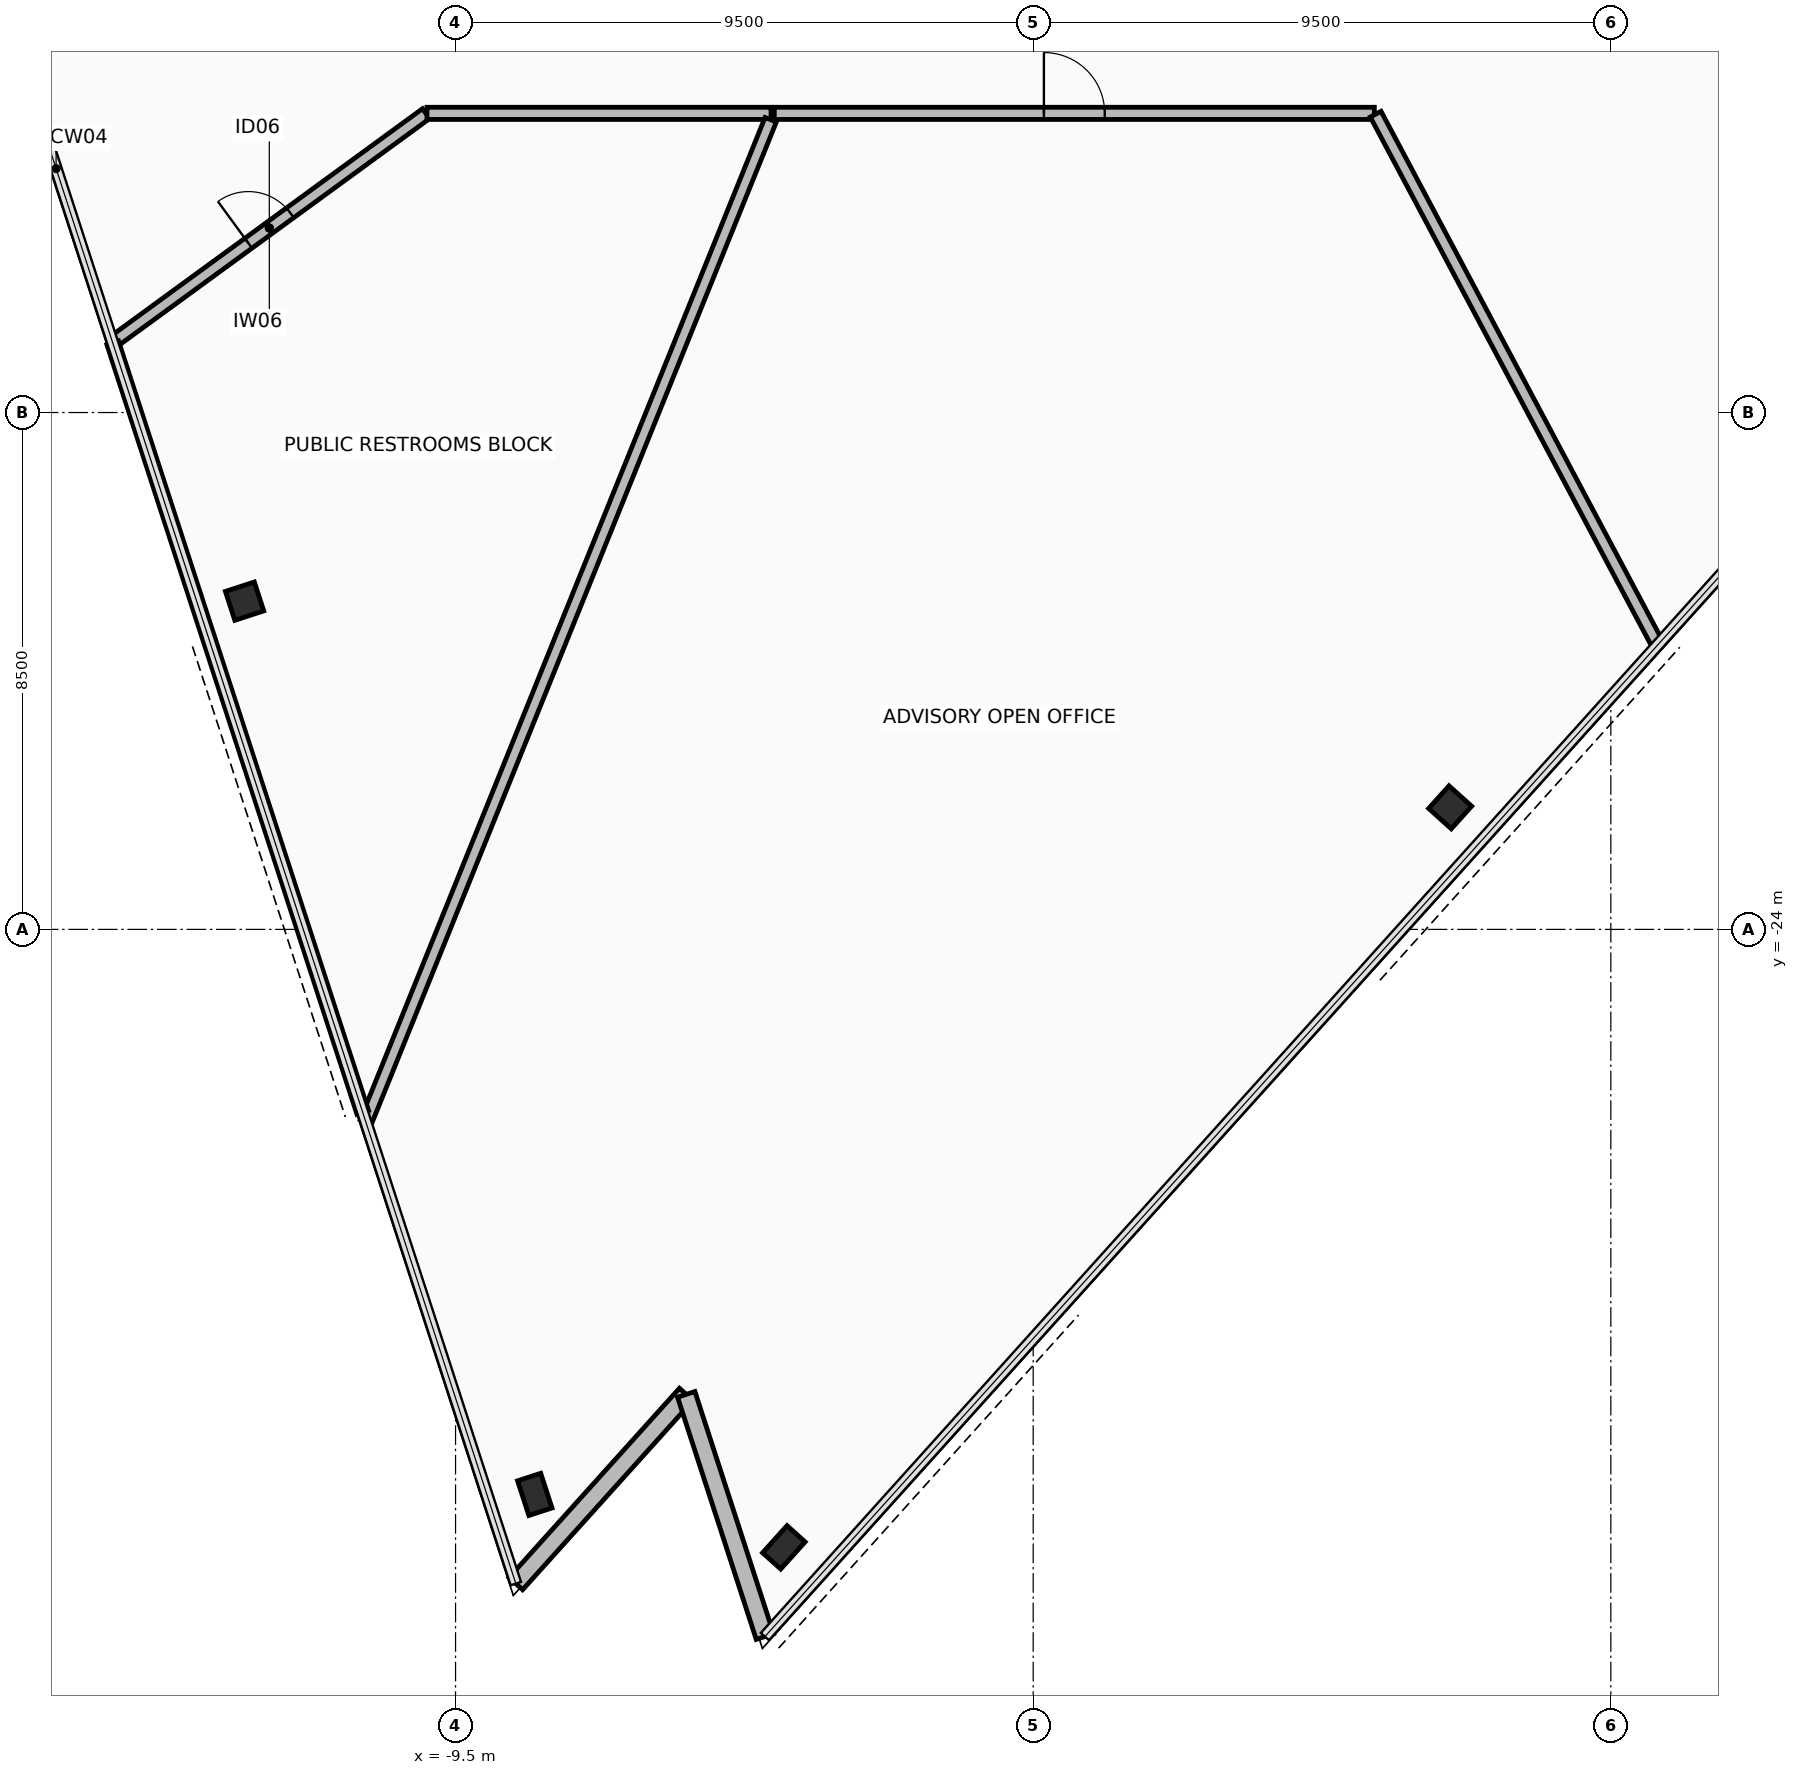
"""IFC4 building model, lengths in metres.
Left out: names, types, materials, properties, quantities, classifications, styles, units other than length and angle.
Written with IfcOpenShell. Run it as: python <this file> out.ifc"""

import sys

from ifc_helpers import new_model, si_unit, direction, frame, frame_2d, origin, origin_2d, place, context, subcontext, project, spatial, rectangle, hollow_rectangle, extrude, element, fill, save


model = new_model("IFC4")
c1 = context("Model", 3, precision=1e-05, world=origin(), true_north=direction((0.0, 1.0)))
c2 = subcontext(c1, "Body", "Model", "MODEL_VIEW")
j1 = project(units=[si_unit("LENGTHUNIT", "METRE"), si_unit("PLANEANGLEUNIT", "RADIAN")], contexts=[c1])
p1 = place(None, origin())
s1 = spatial("IfcSite", under=j1, at=p1, CompositionType="ELEMENT")
p2 = place(p1, origin())
s2 = spatial("IfcBuilding", under=s1, at=p2, CompositionType="ELEMENT")
p3 = place(p2, frame((0.0, 0.0, 200.45)))
s3 = spatial("IfcBuildingStorey", under=s2, at=p3, CompositionType="ELEMENT", Elevation=200.45)
p4 = place(p3, frame((-12.97, -18.602, 0.0), z_axis=(0.0, 0.0, 1.0), x_axis=(-0.309016994375, 0.951056516295, 0.0)))
e1 = element("IfcColumn", 1, at=p4, inside=s3, PredefinedType="COLUMN", context=c2, shape_type="SweptSolid", body=[
    extrude(hollow_rectangle(XDim=0.5, YDim=0.5, WallThickness=0.032, at=origin_2d()), origin(), (0.0, 0.0, 1.0), 3.6),
])
for number, where, z_axis, x_axis in (
    (2, (-8.197, -33.292, 0.0), (0.0, 0.0, 1.0), (-0.309, 0.951, 0.0)),
    (3, (-4.1, -34.162, 0.0), (0.0, 0.0, 1.0), (0.669, 0.743, 0.0)),
):
    element("IfcColumn", number, at=place(p3, frame(where, z_axis=z_axis, x_axis=x_axis)), inside=s3, PredefinedType="COLUMN", context=c2, shape_type="SweptSolid", body=[
        extrude(hollow_rectangle(XDim=0.4, YDim=0.6, WallThickness=0.03, at=origin_2d()), origin(), (0.0, 0.0, 1.0), 3.6),
    ])
p5 = place(p3, frame((6.857, -21.992, 0.0), z_axis=(0.0, 0.0, 1.0), x_axis=(0.669130606359, 0.743144825477, 0.0)))
e4 = element("IfcColumn", 4, at=p5, inside=s3, PredefinedType="COLUMN", context=c2, shape_type="SweptSolid", body=[
    extrude(hollow_rectangle(XDim=0.5, YDim=0.5, WallThickness=0.032, at=origin_2d()), origin(), (0.0, 0.0, 1.0), 3.6),
])
p6 = place(p3, frame((-8.509, -34.759, 0.0), z_axis=(0.0, 0.0, 1.0), x_axis=(0.669151507466, 0.743126005504, 0.0)))
e5 = element("IfcWall", 5, at=p6, inside=s3, PredefinedType="STANDARD", context=c2, shape_type="SweptSolid", body=[
    extrude(rectangle(XDim=4.188, YDim=0.3, at=frame_2d((2.094, 0.0))), origin(), (0.0, 0.0, 1.0), 2.715),
])
p7 = place(p3, frame((-5.706, -31.646, 0.0), z_axis=(0.0, 0.0, 1.0), x_axis=(0.309030708092, -0.951052060329, 0.0)))
e6 = element("IfcWall", 6, at=p7, inside=s3, PredefinedType="STANDARD", context=c2, shape_type="SweptSolid", body=[
    extrude(rectangle(XDim=4.188, YDim=0.3, at=frame_2d((2.094, 0.0))), origin(), (0.0, 0.0, 1.0), 2.715),
])
p8 = place(p3, frame((-15.141, -14.347, 0.0), z_axis=(0.0, 0.0, 1.0), x_axis=(0.807843616105, 0.589396888284, 0.0)))
e7 = element("IfcWall", 7, at=p8, inside=s3, PredefinedType="PARTITIONING", context=c2, shape_type="SweptSolid", body=[
    extrude(rectangle(XDim=6.383, YDim=0.2, at=frame_2d((3.191, 0.0))), origin(), (0.0, 0.0, 1.0), 2.715),
])
p9 = place(p8, frame((2.766, 0.0, 0.0)))
e8 = element("IfcOpeningElement", 8, at=p9, cuts=e7, PredefinedType="OPENING", context=c2, shape_type="SweptSolid", body=[
    extrude(rectangle(XDim=0.85, YDim=2.1, at=frame_2d((0.425, 1.05))), frame((0.0, 0.11, 0.0), z_axis=(0.0, -1.0, 0.0), x_axis=(1.0, 0.0, 0.0)), (0.0, 0.0, 1.0), 0.22),
])
p10 = place(p3, frame((-9.97, -10.58, 0.0), z_axis=(0.0, 0.0, 1.0), x_axis=(1.0, 0.0, 0.0)))
e9 = element("IfcWall", 9, at=p10, inside=s3, PredefinedType="PARTITIONING", context=c2, shape_type="SweptSolid", body=[
    extrude(rectangle(XDim=5.658, YDim=0.2, at=frame_2d((2.829, 0.0))), origin(), (0.0, 0.0, 1.0), 2.865),
])
p11 = place(p3, frame((-4.317, -10.685, 0.0), z_axis=(0.0, 0.0, 1.0), x_axis=(-0.374604298034, -0.927184781958, 0.0)))
e10 = element("IfcWall", 10, at=p11, inside=s3, PredefinedType="PARTITIONING", context=c2, shape_type="SweptSolid", body=[
    extrude(rectangle(XDim=17.775, YDim=0.2, at=frame_2d((8.888, 0.0))), origin(), (0.0, 0.0, 1.0), 2.715),
])
p12 = place(p3, frame((-11.026, -27.011, 0.0), z_axis=(0.0, 0.0, 1.0), x_axis=(-0.309025926892, 0.951053613898, 0.0)))
e11 = element("IfcWall", 11, at=p12, inside=s3, PredefinedType="PARTITIONING", context=c2, shape_type="SweptSolid", body=[
    extrude(rectangle(XDim=13.309, YDim=0.2, at=frame_2d((6.654, 0.0))), origin(), (0.0, 0.0, 1.0), 3.42),
])
p13 = place(p3, frame((-4.258, -10.58, 0.0), z_axis=(0.0, 0.0, 1.0), x_axis=(1.0, 0.0, 0.0)))
e12 = element("IfcWall", 12, at=p13, inside=s3, PredefinedType="PARTITIONING", context=c2, shape_type="SweptSolid", body=[
    extrude(rectangle(XDim=9.868, YDim=0.2, at=frame_2d((4.934, 0.0))), origin(), (0.0, 0.0, 1.0), 2.865),
])
p14 = place(p13, frame((4.434, 0.0, 0.0)))
e13 = element("IfcOpeningElement", 13, at=p14, cuts=e12, PredefinedType="OPENING", context=c2, shape_type="SweptSolid", body=[
    extrude(rectangle(XDim=1.0, YDim=2.15, at=frame_2d((0.5, 1.075))), frame((0.0, 0.11, 0.0), z_axis=(0.0, -1.0, 0.0), x_axis=(1.0, 0.0, 0.0)), (0.0, 0.0, 1.0), 0.22),
])
p15 = place(p3, frame((5.633, -10.593, 0.0), z_axis=(0.0, 0.0, 1.0), x_axis=(0.46946276715, -0.882952269525, 0.0)))
e14 = element("IfcWall", 14, at=p15, inside=s3, PredefinedType="PARTITIONING", context=c2, shape_type="SweptSolid", body=[
    extrude(rectangle(XDim=9.866, YDim=0.2, at=frame_2d((4.933, 0.0))), origin(), (0.0, 0.0, 1.0), 2.715),
])
p16 = place(p9, origin())
e15 = element("IfcDoor", 15, at=p16, inside=s3, OperationType="SINGLE_SWING_RIGHT", PredefinedType="DOOR", context=c2, shape_type="SweptSolid", body=[
    extrude(rectangle(XDim=0.85, YDim=2.1, at=frame_2d((0.425, 1.05))), frame((0.0, 0.025, 0.0), z_axis=(0.0, -1.0, 0.0), x_axis=(1.0, 0.0, 0.0)), (0.0, 0.0, 1.0), 0.05),
])
fill(e8, e15)
p17 = place(p14, origin())
e16 = element("IfcDoor", 16, at=p17, inside=s3, OperationType="SINGLE_SWING_RIGHT", PredefinedType="DOOR", context=c2, shape_type="SweptSolid", body=[
    extrude(rectangle(XDim=1.0, YDim=2.15, at=frame_2d((0.5, 1.075))), frame((0.0, 0.025, 0.0), z_axis=(0.0, -1.0, 0.0), x_axis=(1.0, 0.0, 0.0)), (0.0, 0.0, 1.0), 0.05),
])
fill(e13, e16)
save(model, sys.argv[1])
